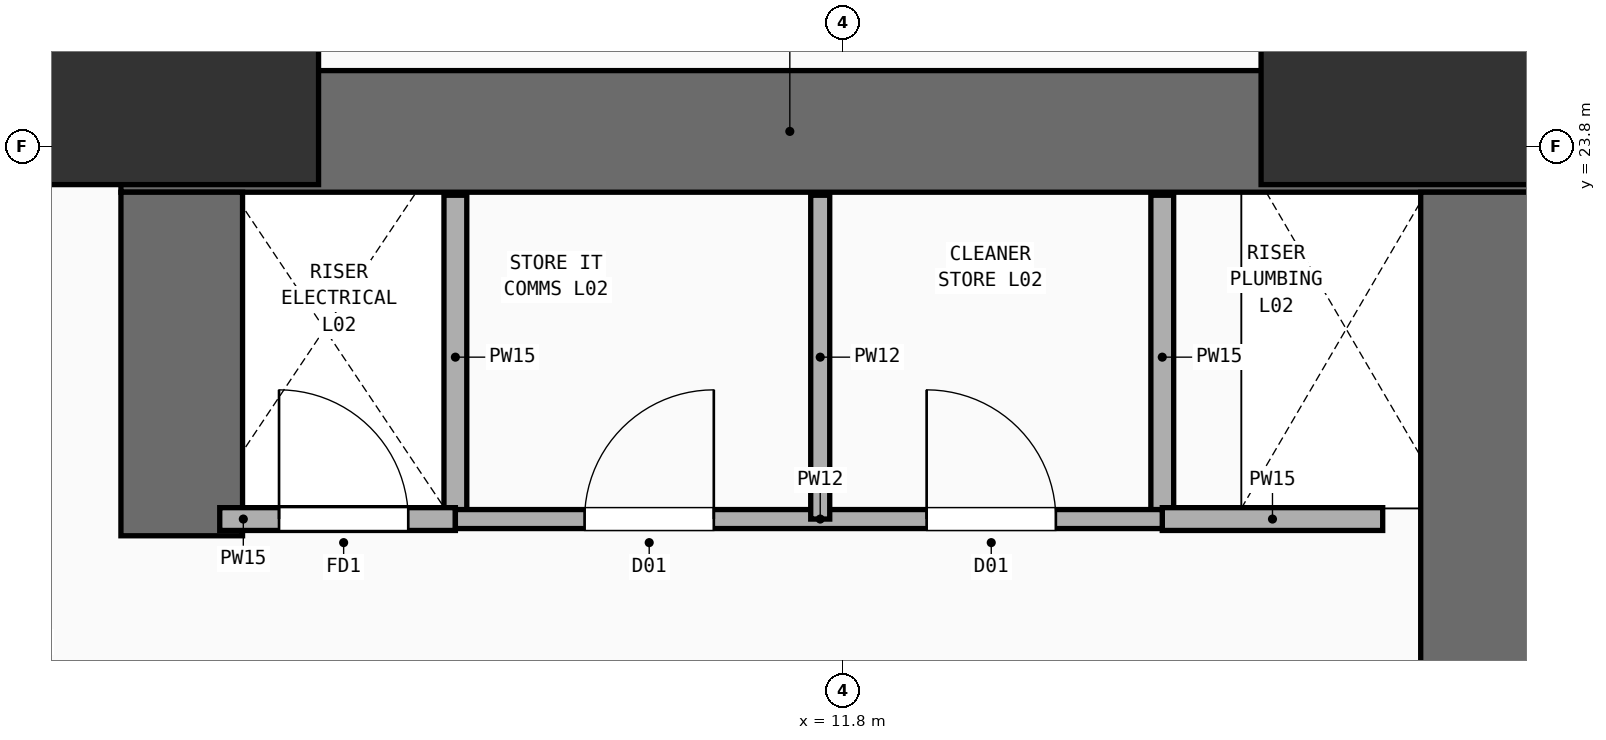
"""IFC4 building model, lengths in metres.
Left out: names, types, materials, properties, quantities, classifications, styles, units other than length and angle.
Written with IfcOpenShell. Run it as: python <this file> out.ifc"""

import sys

from ifc_helpers import new_model, si_unit, direction, frame, frame_2d, origin, origin_2d, place, context, subcontext, project, spatial, rectangle, extrude, element, fill, save


model = new_model("IFC4")
c1 = context("Model", 3, precision=1e-05, world=origin(), true_north=direction((0.0, 1.0)))
c2 = subcontext(c1, "Body", "Model", "MODEL_VIEW")
j1 = project(units=[si_unit("LENGTHUNIT", "METRE"), si_unit("PLANEANGLEUNIT", "RADIAN")], contexts=[c1])
p1 = place(None, origin())
s1 = spatial("IfcSite", under=j1, at=p1, CompositionType="ELEMENT")
p2 = place(p1, origin())
s2 = spatial("IfcBuilding", under=s1, at=p2, CompositionType="ELEMENT")
p3 = place(p2, frame((0.0, 0.0, 5.6)))
s3 = spatial("IfcBuildingStorey", under=s2, at=p3, CompositionType="ELEMENT", Elevation=5.6)
p4 = place(p3, frame((7.05, 23.9, 0.0), z_axis=(0.0, 0.0, 1.0), x_axis=(1.0, 0.0, 0.0)))
e1 = element("IfcWall", 1, at=p4, inside=s3, PredefinedType="SHEAR", context=c2, shape_type="SweptSolid", body=[
    extrude(rectangle(XDim=14.15, YDim=0.8, at=frame_2d((7.075, 0.0))), origin(), (0.0, 0.0, 1.0), 4.46),
])
p5 = place(p3, frame((7.45, 21.24, 0.0), z_axis=(0.0, 0.0, 1.0), x_axis=(0.0, 1.0, 0.0)))
e2 = element("IfcWall", 2, at=p5, inside=s3, PredefinedType="SHEAR", context=c2, shape_type="SweptSolid", body=[
    extrude(rectangle(XDim=2.26, YDim=0.8, at=frame_2d((1.13, 0.0))), origin(), (0.0, 0.0, 1.0), 4.46),
])
p6 = place(p3, frame((16.0, 14.4, 0.0), z_axis=(0.0, 0.0, 1.0), x_axis=(0.0, 1.0, 0.0)))
e3 = element("IfcWall", 3, at=p6, inside=s3, PredefinedType="SHEAR", context=c2, shape_type="SweptSolid", body=[
    extrude(rectangle(XDim=9.1, YDim=0.8, at=frame_2d((4.55, 0.0))), origin(), (0.0, 0.0, 1.0), 4.46),
])
for number, where, z_axis, x_axis in (
    (4, (7.45, 24.45, 0.0), (0.0, 0.0, 1.0), (1.0, 0.0, 0.0)),
    (5, (15.45, 24.45, 0.0), (0.0, 0.0, 1.0), (1.0, 0.0, 0.0)),
):
    element("IfcColumn", number, at=place(p3, frame(where, z_axis=z_axis, x_axis=x_axis)), inside=s3, PredefinedType="COLUMN", context=c2, shape_type="SweptSolid", body=[
        extrude(rectangle(XDim=1.8, YDim=1.8, at=origin_2d()), origin(), (0.0, 0.0, 1.0), 4.46),
    ])
for number, where, z_axis, x_axis in (
    (6, (9.25, 21.35, 0.0), (0.0, 0.0, 1.0), (0.0, 1.0, 0.0)),
    (7, (13.9, 21.35, 0.0), (0.0, 0.0, 1.0), (0.0, 1.0, 0.0)),
):
    element("IfcWall", number, at=place(p3, frame(where, z_axis=z_axis, x_axis=x_axis)), inside=s3, PredefinedType="PARTITIONING", context=c2, shape_type="SweptSolid", body=[
        extrude(rectangle(XDim=2.13, YDim=0.15, at=frame_2d((1.065, 0.0))), origin(), (0.0, 0.0, 1.0), 4.46),
    ])
p7 = place(p3, frame((7.7, 21.35, 0.0), z_axis=(0.0, 0.0, 1.0), x_axis=(1.0, 0.0, 0.0)))
e8 = element("IfcWall", 8, at=p7, inside=s3, PredefinedType="PARTITIONING", context=c2, shape_type="SweptSolid", body=[
    extrude(rectangle(XDim=1.55, YDim=0.15, at=frame_2d((0.775, 0.0))), origin(), (0.0, 0.0, 1.0), 4.46),
])
p8 = place(p7, frame((0.39, 0.0, 0.0)))
e9 = element("IfcOpeningElement", 9, at=p8, cuts=e8, PredefinedType="OPENING", context=c2, shape_type="SweptSolid", body=[
    extrude(rectangle(XDim=0.85, YDim=2.15, at=frame_2d((0.425, 1.075))), frame((0.0, 0.085, 0.0), z_axis=(0.0, -1.0, 0.0), x_axis=(1.0, 0.0, 0.0)), (0.0, 0.0, 1.0), 0.17),
])
p9 = place(p3, frame((13.9, 21.35, 0.0), z_axis=(0.0, 0.0, 1.0), x_axis=(1.0, 0.0, 0.0)))
e10 = element("IfcWall", 10, at=p9, inside=s3, PredefinedType="PARTITIONING", context=c2, shape_type="SweptSolid", body=[
    extrude(rectangle(XDim=1.45, YDim=0.15, at=frame_2d((0.725, 0.0))), origin(), (0.0, 0.0, 1.0), 4.46),
])
p10 = place(p3, frame((9.25, 21.35, 0.0), z_axis=(0.0, 0.0, 1.0), x_axis=(1.0, 0.0, 0.0)))
e11 = element("IfcWall", 11, at=p10, inside=s3, PredefinedType="PARTITIONING", context=c2, shape_type="SweptSolid", body=[
    extrude(rectangle(XDim=4.65, YDim=0.125, at=frame_2d((2.325, 0.0))), origin(), (0.0, 0.0, 1.0), 4.46),
])
p11 = place(p10, frame((0.85, 0.0, 0.0)))
e12 = element("IfcOpeningElement", 12, at=p11, cuts=e11, PredefinedType="OPENING", context=c2, shape_type="SweptSolid", body=[
    extrude(rectangle(XDim=0.85, YDim=2.15, at=frame_2d((0.425, 1.075))), frame((0.0, 0.073, 0.0), z_axis=(0.0, -1.0, 0.0), x_axis=(1.0, 0.0, 0.0)), (0.0, 0.0, 1.0), 0.145),
])
p12 = place(p10, frame((3.1, 0.0, 0.0)))
e13 = element("IfcOpeningElement", 13, at=p12, cuts=e11, PredefinedType="OPENING", context=c2, shape_type="SweptSolid", body=[
    extrude(rectangle(XDim=0.85, YDim=2.15, at=frame_2d((0.425, 1.075))), frame((0.0, 0.073, 0.0), z_axis=(0.0, -1.0, 0.0), x_axis=(1.0, 0.0, 0.0)), (0.0, 0.0, 1.0), 0.145),
])
p13 = place(p3, frame((11.65, 21.35, 0.0), z_axis=(0.0, 0.0, 1.0), x_axis=(0.0, 1.0, 0.0)))
e14 = element("IfcWall", 14, at=p13, inside=s3, PredefinedType="PARTITIONING", context=c2, shape_type="SweptSolid", body=[
    extrude(rectangle(XDim=2.13, YDim=0.125, at=frame_2d((1.065, 0.0))), origin(), (0.0, 0.0, 1.0), 4.46),
])
p14 = place(p8, origin())
e15 = element("IfcDoor", 15, at=p14, inside=s3, OperationType="SINGLE_SWING_LEFT", PredefinedType="DOOR", context=c2, shape_type="SweptSolid", body=[
    extrude(rectangle(XDim=0.85, YDim=2.15, at=frame_2d((0.425, 1.075))), frame((0.0, 0.025, 0.0), z_axis=(0.0, -1.0, 0.0), x_axis=(1.0, 0.0, 0.0)), (0.0, 0.0, 1.0), 0.05),
])
fill(e9, e15)
p15 = place(p11, origin())
e16 = element("IfcDoor", 16, at=p15, inside=s3, OperationType="SINGLE_SWING_RIGHT", PredefinedType="DOOR", context=c2, shape_type="SweptSolid", body=[
    extrude(rectangle(XDim=0.85, YDim=2.15, at=frame_2d((0.425, 1.075))), frame((0.0, 0.025, 0.0), z_axis=(0.0, -1.0, 0.0), x_axis=(1.0, 0.0, 0.0)), (0.0, 0.0, 1.0), 0.05),
])
fill(e12, e16)
p16 = place(p12, origin())
e17 = element("IfcDoor", 17, at=p16, inside=s3, OperationType="SINGLE_SWING_LEFT", PredefinedType="DOOR", context=c2, shape_type="SweptSolid", body=[
    extrude(rectangle(XDim=0.85, YDim=2.15, at=frame_2d((0.425, 1.075))), frame((0.0, 0.025, 0.0), z_axis=(0.0, -1.0, 0.0), x_axis=(1.0, 0.0, 0.0)), (0.0, 0.0, 1.0), 0.05),
])
fill(e13, e17)
save(model, sys.argv[1])
